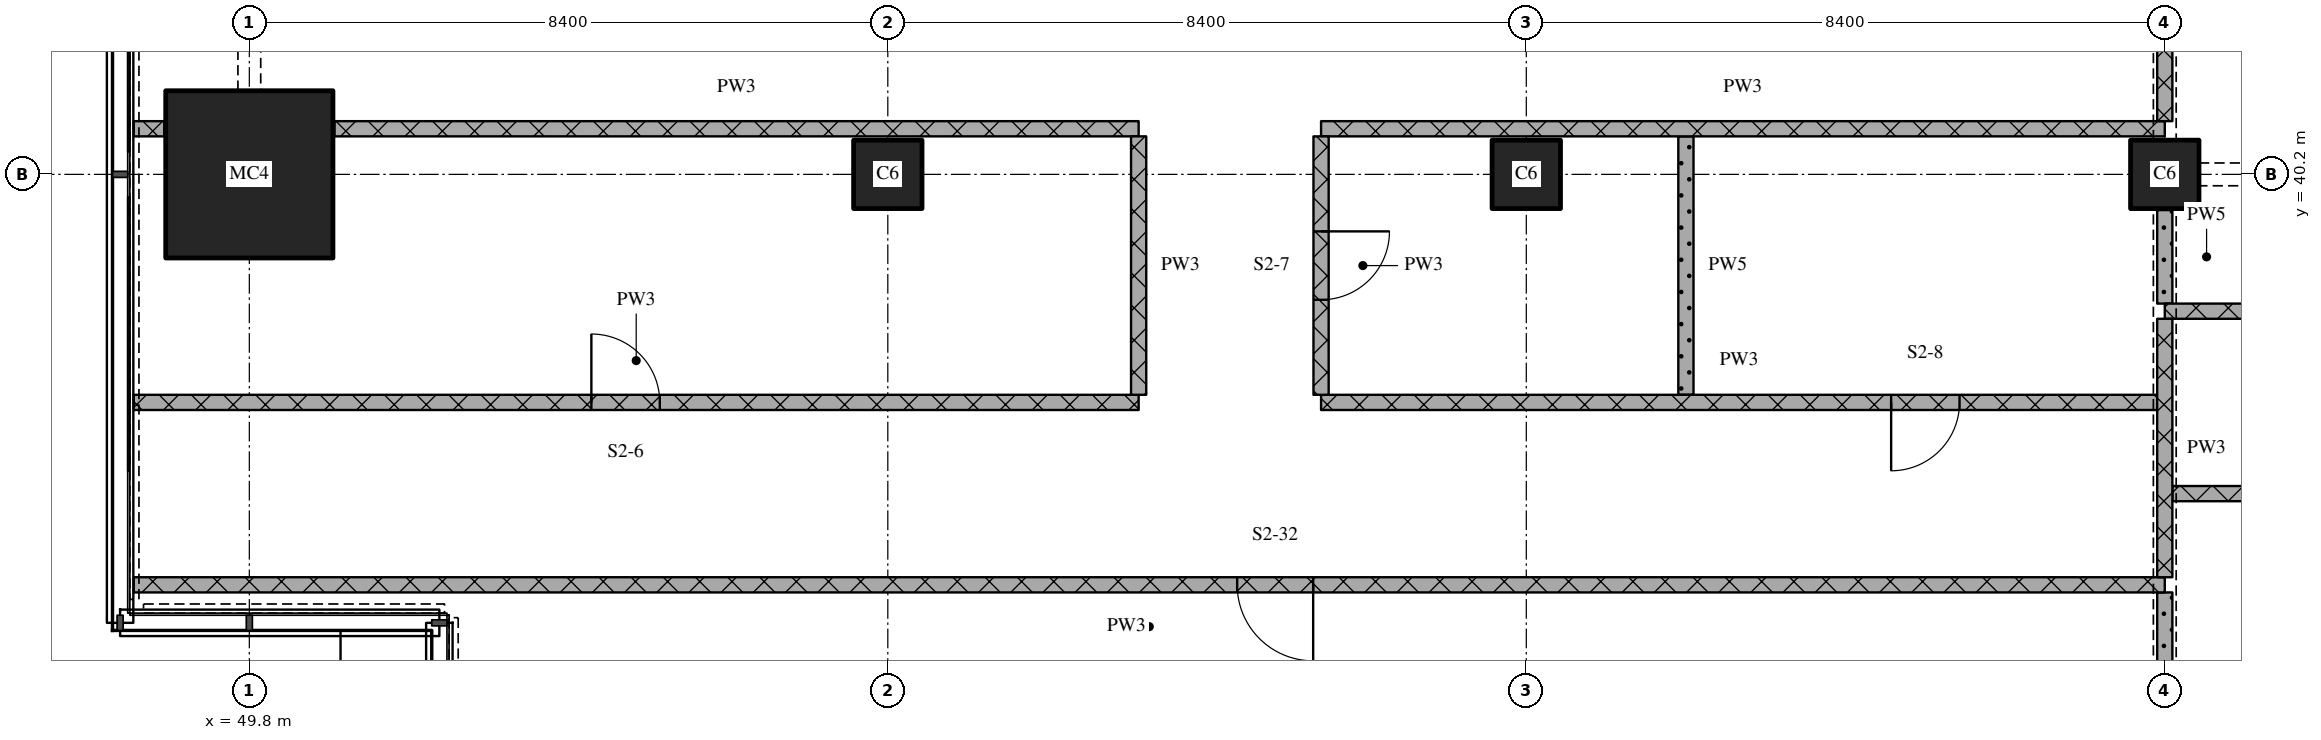
"""IFC4 building model, lengths in metres.
Left out: names, types, materials, properties, quantities, classifications, styles, units other than length and angle.
Written with IfcOpenShell. Run it as: python <this file> out.ifc"""

import sys

from ifc_helpers import new_model, si_unit, direction, frame, frame_2d, origin, origin_2d, place, context, subcontext, project, spatial, rectangle, extrude, element, fill, save


model = new_model("IFC4")
c1 = context("Model", 3, precision=1e-05, world=origin(), true_north=direction((0.0, 1.0)))
c2 = subcontext(c1, "Body", "Model", "MODEL_VIEW")
j1 = project(units=[si_unit("LENGTHUNIT", "METRE"), si_unit("PLANEANGLEUNIT", "RADIAN")], contexts=[c1])
p1 = place(None, origin())
s1 = spatial("IfcSite", under=j1, at=p1, CompositionType="ELEMENT")
p2 = place(p1, origin())
s2 = spatial("IfcBuilding", under=s1, at=p2, CompositionType="ELEMENT")
p3 = place(p2, frame((0.0, 0.0, 32.7)))
s3 = spatial("IfcBuildingStorey", under=s2, at=p3, CompositionType="ELEMENT", Elevation=32.7)
p4 = place(p3, frame((49.8, 40.2, 0.0), z_axis=(0.0, 0.0, 1.0), x_axis=(1.0, 0.0, 0.0)))
e1 = element("IfcColumn", 1, at=p4, inside=s3, PredefinedType="COLUMN", context=c2, shape_type="SweptSolid", body=[
    extrude(rectangle(XDim=2.2, YDim=2.2, at=origin_2d()), origin(), (0.0, 0.0, 1.0), 4.5),
])
for number, where, z_axis, x_axis in (
    (2, (58.2, 40.2, 0.0), (0.0, 0.0, 1.0), (1.0, 0.0, 0.0)),
    (3, (66.6, 40.2, 0.0), (0.0, 0.0, 1.0), (1.0, 0.0, 0.0)),
    (4, (75.0, 40.2, 0.0), (0.0, 0.0, 1.0), (1.0, 0.0, 0.0)),
):
    element("IfcColumn", number, at=place(p3, frame(where, z_axis=z_axis, x_axis=x_axis)), inside=s3, PredefinedType="COLUMN", context=c2, shape_type="SweptSolid", body=[
        extrude(rectangle(XDim=0.9, YDim=0.9, at=origin_2d()), origin(), (0.0, 0.0, 1.0), 4.5),
    ])
p5 = place(p3, frame((75.0, 34.8, 0.0), z_axis=(0.0, 0.0, 1.0), x_axis=(-1.0, 0.0, 0.0)))
e5 = element("IfcWall", 5, at=p5, inside=s3, PredefinedType="PARTITIONING", context=c2, shape_type="SweptSolid", body=[
    extrude(rectangle(XDim=26.72, YDim=0.2, at=frame_2d((13.36, 0.0))), origin(), (0.0, 0.0, 1.0), 4.22),
])
p6 = place(p5, frame((11.204, 0.0, 0.0)))
e6 = element("IfcOpeningElement", 6, at=p6, cuts=e5, PredefinedType="OPENING", context=c2, shape_type="SweptSolid", body=[
    extrude(rectangle(XDim=1.0, YDim=2.1, at=frame_2d((0.5, 1.05))), frame((0.0, 0.11, 0.0), z_axis=(0.0, -1.0, 0.0), x_axis=(1.0, 0.0, 0.0)), (0.0, 0.0, 1.0), 0.22),
])
p7 = place(p3, frame((100.1, 36.0, 0.0), z_axis=(0.0, 0.0, 1.0), x_axis=(-1.0, 0.0, 0.0)))
e7 = element("IfcWall", 7, at=p7, inside=s3, PredefinedType="PARTITIONING", context=c2, shape_type="SweptSolid", body=[
    extrude(rectangle(XDim=25.0, YDim=0.2, at=frame_2d((12.5, 0.0))), origin(), (0.0, 0.0, 1.0), 4.22),
])
p8 = place(p7, frame((12.0, 0.0, 0.0)))
e8 = element("IfcOpeningElement", 8, at=p8, cuts=e7, PredefinedType="OPENING", context=c2, shape_type="SweptSolid", body=[
    extrude(rectangle(XDim=1.0, YDim=2.1, at=frame_2d((0.5, 1.05))), frame((0.0, 0.11, 0.0), z_axis=(0.0, -1.0, 0.0), x_axis=(1.0, 0.0, 0.0)), (0.0, 0.0, 1.0), 0.22),
])
p9 = place(p3, frame((48.28, 37.2, 0.0), z_axis=(0.0, 0.0, 1.0), x_axis=(1.0, 0.0, 0.0)))
e9 = element("IfcWall", 9, at=p9, inside=s3, PredefinedType="PARTITIONING", context=c2, shape_type="SweptSolid", body=[
    extrude(rectangle(XDim=13.22, YDim=0.2, at=frame_2d((6.61, 0.0))), origin(), (0.0, 0.0, 1.0), 4.22),
])
p10 = place(p9, frame((6.02, 0.0, 0.0)))
e10 = element("IfcOpeningElement", 10, at=p10, cuts=e9, PredefinedType="OPENING", context=c2, shape_type="SweptSolid", body=[
    extrude(rectangle(XDim=0.9, YDim=2.1, at=frame_2d((0.45, 1.05))), frame((0.0, 0.11, 0.0), z_axis=(0.0, -1.0, 0.0), x_axis=(1.0, 0.0, 0.0)), (0.0, 0.0, 1.0), 0.22),
])
p11 = place(p3, frame((63.9, 37.2, 0.0), z_axis=(0.0, 0.0, 1.0), x_axis=(1.0, 0.0, 0.0)))
e11 = element("IfcWall", 11, at=p11, inside=s3, PredefinedType="PARTITIONING", context=c2, shape_type="SweptSolid", body=[
    extrude(rectangle(XDim=11.0, YDim=0.2, at=frame_2d((5.5, 0.0))), origin(), (0.0, 0.0, 1.0), 4.22),
])
p12 = place(p11, frame((7.5, 0.0, 0.0)))
e12 = element("IfcOpeningElement", 12, at=p12, cuts=e11, PredefinedType="OPENING", context=c2, shape_type="SweptSolid", body=[
    extrude(rectangle(XDim=0.9, YDim=2.1, at=frame_2d((0.45, 1.05))), frame((0.0, 0.11, 0.0), z_axis=(0.0, -1.0, 0.0), x_axis=(1.0, 0.0, 0.0)), (0.0, 0.0, 1.0), 0.22),
])
p13 = place(p3, frame((75.0, 38.4, 0.0), z_axis=(0.0, 0.0, 1.0), x_axis=(1.0, 0.0, 0.0)))
e13 = element("IfcWall", 13, at=p13, inside=s3, PredefinedType="PARTITIONING", context=c2, shape_type="SweptSolid", body=[
    extrude(rectangle(XDim=11.4, YDim=0.2, at=frame_2d((5.7, 0.0))), origin(), (0.0, 0.0, 1.0), 4.22),
])
p14 = place(p13, frame((1.35, 0.0, 0.0)))
e14 = element("IfcOpeningElement", 14, at=p14, cuts=e13, PredefinedType="OPENING", context=c2, shape_type="SweptSolid", body=[
    extrude(rectangle(XDim=0.9, YDim=2.1, at=frame_2d((0.45, 1.05))), frame((0.0, 0.11, 0.0), z_axis=(0.0, -1.0, 0.0), x_axis=(1.0, 0.0, 0.0)), (0.0, 0.0, 1.0), 0.22),
])
p15 = place(p13, frame((4.65, 0.0, 0.0)))
e15 = element("IfcOpeningElement", 15, at=p15, cuts=e13, PredefinedType="OPENING", context=c2, shape_type="SweptSolid", body=[
    extrude(rectangle(XDim=0.9, YDim=2.1, at=frame_2d((0.45, 1.05))), frame((0.0, 0.11, 0.0), z_axis=(0.0, -1.0, 0.0), x_axis=(1.0, 0.0, 0.0)), (0.0, 0.0, 1.0), 0.22),
])
p16 = place(p13, frame((8.55, 0.0, 0.0)))
e16 = element("IfcOpeningElement", 16, at=p16, cuts=e13, PredefinedType="OPENING", context=c2, shape_type="SweptSolid", body=[
    extrude(rectangle(XDim=0.9, YDim=2.1, at=frame_2d((0.45, 1.05))), frame((0.0, 0.11, 0.0), z_axis=(0.0, -1.0, 0.0), x_axis=(1.0, 0.0, 0.0)), (0.0, 0.0, 1.0), 0.22),
])
p17 = place(p3, frame((48.28, 40.8, 0.0), z_axis=(0.0, 0.0, 1.0), x_axis=(1.0, 0.0, 0.0)))
e17 = element("IfcWall", 17, at=p17, inside=s3, PredefinedType="PARTITIONING", context=c2, shape_type="SweptSolid", body=[
    extrude(rectangle(XDim=0.4, YDim=0.2, at=frame_2d((0.2, 0.0))), origin(), (0.0, 0.0, 1.0), 4.22),
])
p18 = place(p3, frame((50.92, 40.8, 0.0), z_axis=(0.0, 0.0, 1.0), x_axis=(1.0, 0.0, 0.0)))
e18 = element("IfcWall", 18, at=p18, inside=s3, PredefinedType="PARTITIONING", context=c2, shape_type="SweptSolid", body=[
    extrude(rectangle(XDim=10.58, YDim=0.2, at=frame_2d((5.29, 0.0))), origin(), (0.0, 0.0, 1.0), 4.22),
])
p19 = place(p3, frame((63.9, 40.8, 0.0), z_axis=(0.0, 0.0, 1.0), x_axis=(1.0, 0.0, 0.0)))
e19 = element("IfcWall", 19, at=p19, inside=s3, PredefinedType="PARTITIONING", context=c2, shape_type="SweptSolid", body=[
    extrude(rectangle(XDim=11.1, YDim=0.2, at=frame_2d((5.55, 0.0))), origin(), (0.0, 0.0, 1.0), 4.22),
])
p20 = place(p3, frame((61.5, 40.7, 0.0), z_axis=(0.0, 0.0, 1.0), x_axis=(0.0, -1.0, 0.0)))
e20 = element("IfcWall", 20, at=p20, inside=s3, PredefinedType="PARTITIONING", context=c2, shape_type="SweptSolid", body=[
    extrude(rectangle(XDim=3.4, YDim=0.2, at=frame_2d((1.7, 0.0))), origin(), (0.0, 0.0, 1.0), 4.22),
])
p21 = place(p3, frame((63.9, 40.7, 0.0), z_axis=(0.0, 0.0, 1.0), x_axis=(0.0, -1.0, 0.0)))
e21 = element("IfcWall", 21, at=p21, inside=s3, PredefinedType="PARTITIONING", context=c2, shape_type="SweptSolid", body=[
    extrude(rectangle(XDim=3.4, YDim=0.2, at=frame_2d((1.7, 0.0))), origin(), (0.0, 0.0, 1.0), 4.22),
])
p22 = place(p21, frame((1.25, 0.0, 0.0)))
e22 = element("IfcOpeningElement", 22, at=p22, cuts=e21, PredefinedType="OPENING", context=c2, shape_type="SweptSolid", body=[
    extrude(rectangle(XDim=0.9, YDim=2.1, at=frame_2d((0.45, 1.05))), frame((0.0, 0.11, 0.0), z_axis=(0.0, -1.0, 0.0), x_axis=(1.0, 0.0, 0.0)), (0.0, 0.0, 1.0), 0.22),
])
p23 = place(p3, frame((68.7, 40.7, 0.0), z_axis=(0.0, 0.0, 1.0), x_axis=(0.0, -1.0, 0.0)))
e23 = element("IfcWall", 23, at=p23, inside=s3, PredefinedType="PARTITIONING", context=c2, shape_type="SweptSolid", body=[
    extrude(rectangle(XDim=3.4, YDim=0.2, at=frame_2d((1.7, 0.0))), origin(), (0.0, 0.0, 1.0), 4.22),
])
p24 = place(p3, frame((75.0, 38.3, 0.0), z_axis=(0.0, 0.0, 1.0), x_axis=(0.0, -1.0, 0.0)))
e24 = element("IfcWall", 24, at=p24, inside=s3, PredefinedType="PARTITIONING", context=c2, shape_type="SweptSolid", body=[
    extrude(rectangle(XDim=3.4, YDim=0.2, at=frame_2d((1.7, 0.0))), origin(), (0.0, 0.0, 1.0), 3.73),
])
p25 = place(p3, frame((75.0, 43.1, 0.0), z_axis=(0.0, 0.0, 1.0), x_axis=(0.0, -1.0, 0.0)))
e25 = element("IfcWall", 25, at=p25, inside=s3, PredefinedType="PARTITIONING", context=c2, shape_type="SweptSolid", body=[
    extrude(rectangle(XDim=2.2, YDim=0.2, at=frame_2d((1.1, 0.0))), origin(), (0.0, 0.0, 1.0), 3.33),
])
p26 = place(p3, frame((75.0, 34.7, 0.0), z_axis=(0.0, 0.0, 1.0), x_axis=(0.0, -1.0, 0.0)))
e26 = element("IfcWall", 26, at=p26, inside=s3, PredefinedType="PARTITIONING", context=c2, shape_type="SweptSolid", body=[
    extrude(rectangle(XDim=2.43, YDim=0.2, at=frame_2d((1.215, 0.0))), origin(), (0.0, 0.0, 1.0), 3.73),
])
p27 = place(p3, frame((75.0, 39.73, 0.0), z_axis=(0.0, 0.0, 1.0), x_axis=(0.0, -1.0, 0.0)))
e27 = element("IfcWall", 27, at=p27, inside=s3, PredefinedType="PARTITIONING", context=c2, shape_type="SweptSolid", body=[
    extrude(rectangle(XDim=1.23, YDim=0.2, at=frame_2d((0.615, 0.0))), origin(), (0.0, 0.0, 1.0), 3.73),
])
p28 = place(p6, origin())
e28 = element("IfcDoor", 28, at=p28, inside=s3, OperationType="SINGLE_SWING_LEFT", PredefinedType="DOOR", context=c2, shape_type="SweptSolid", body=[
    extrude(rectangle(XDim=1.0, YDim=2.1, at=frame_2d((0.5, 1.05))), frame((0.0, 0.025, 0.0), z_axis=(0.0, -1.0, 0.0), x_axis=(1.0, 0.0, 0.0)), (0.0, 0.0, 1.0), 0.05),
])
fill(e6, e28)
p29 = place(p10, origin())
e29 = element("IfcDoor", 29, at=p29, inside=s3, OperationType="SINGLE_SWING_LEFT", PredefinedType="DOOR", context=c2, shape_type="SweptSolid", body=[
    extrude(rectangle(XDim=0.9, YDim=2.1, at=frame_2d((0.45, 1.05))), frame((0.0, 0.025, 0.0), z_axis=(0.0, -1.0, 0.0), x_axis=(1.0, 0.0, 0.0)), (0.0, 0.0, 1.0), 0.05),
])
fill(e10, e29)
p30 = place(p12, origin())
e30 = element("IfcDoor", 30, at=p30, inside=s3, OperationType="SINGLE_SWING_RIGHT", PredefinedType="DOOR", context=c2, shape_type="SweptSolid", body=[
    extrude(rectangle(XDim=0.9, YDim=2.1, at=frame_2d((0.45, 1.05))), frame((0.0, 0.025, 0.0), z_axis=(0.0, -1.0, 0.0), x_axis=(1.0, 0.0, 0.0)), (0.0, 0.0, 1.0), 0.05),
])
fill(e12, e30)
p31 = place(p22, origin())
e31 = element("IfcDoor", 31, at=p31, inside=s3, OperationType="SINGLE_SWING_LEFT", PredefinedType="DOOR", context=c2, shape_type="SweptSolid", body=[
    extrude(rectangle(XDim=0.9, YDim=2.1, at=frame_2d((0.45, 1.05))), frame((0.0, 0.025, 0.0), z_axis=(0.0, -1.0, 0.0), x_axis=(1.0, 0.0, 0.0)), (0.0, 0.0, 1.0), 0.05),
])
fill(e22, e31)
save(model, sys.argv[1])
